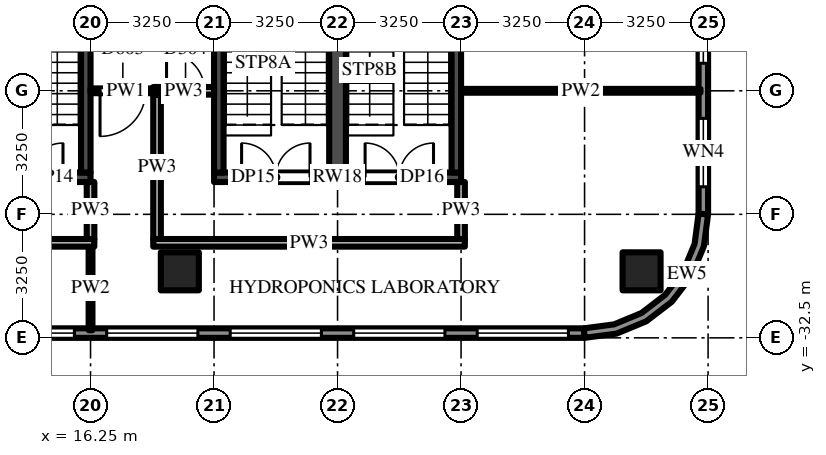
"""IFC4 building model, lengths in metres.
Left out: names, types, materials, properties, quantities, classifications, styles, units other than length and angle.
Written with IfcOpenShell. Run it as: python <this file> out.ifc"""

import sys

from ifc_helpers import new_model, si_unit, direction, frame, frame_2d, origin, origin_2d, place, context, subcontext, project, spatial, polyline, rectangle, outline, extrude, source, transform, mapped, element, fill, save


model = new_model("IFC4")
c1 = context("Model", 3, precision=1e-05, world=origin(), true_north=direction((0.0, 1.0)))
c2 = subcontext(c1, "Body", "Model", "MODEL_VIEW")
j1 = project(units=[si_unit("LENGTHUNIT", "METRE"), si_unit("PLANEANGLEUNIT", "RADIAN")], contexts=[c1])
p1 = place(None, origin())
s1 = spatial("IfcSite", under=j1, at=p1, CompositionType="ELEMENT")
p2 = place(p1, origin())
s2 = spatial("IfcBuilding", under=s1, at=p2, CompositionType="ELEMENT")
p3 = place(p2, frame((0.0, 0.0, 24.0)))
s3 = spatial("IfcBuildingStorey", under=s2, at=p3, CompositionType="ELEMENT", Elevation=24.0)
m1 = source(origin(), c2, "Body", "SweptSolid", [
    extrude(rectangle(XDim=1.0, YDim=1.0, at=origin_2d()), origin(), (0.0, 0.0, 1.0), 5.0),
])
for number, where, z_axis, x_axis in (
    (1, (18.6, -30.75, 0.0), (0.0, 0.0, 1.0), (1.0, 0.0, 0.0)),
    (2, (30.75, -30.75, 0.0), (0.0, 0.0, 1.0), (1.0, 0.0, 0.0)),
):
    element("IfcColumn", number, at=place(p3, frame(where, z_axis=z_axis, x_axis=x_axis)), inside=s3, PredefinedType="COLUMN", context=c2, shape_type="MappedRepresentation", body=[
        mapped(m1, transform((0.0, 0.0, 0.0))),
    ])
m2 = source(origin(), c2, "Body", "SweptSolid", [
    extrude(rectangle(XDim=6.5, YDim=0.25, at=frame_2d((3.25, 0.0))), origin(), (0.0, 0.0, 1.0), 4.7),
])
p4 = place(p3, frame((9.75, -28.275, 0.0), z_axis=(0.0, 0.0, 1.0), x_axis=(1.0, 0.0, 0.0)))
e3 = element("IfcWall", 3, at=p4, inside=s3, PredefinedType="SHEAR", context=c2, shape_type="MappedRepresentation", body=[
    mapped(m2, transform((0.0, 0.0, 0.0))),
])
m3 = source(origin(), c2, "Body", "SweptSolid", [
    extrude(rectangle(XDim=1.8, YDim=2.1, at=frame_2d((0.9, 1.05))), frame((0.0, 0.135, 0.0), z_axis=(0.0, -1.0, 0.0), x_axis=(1.0, 0.0, 0.0)), (0.0, 0.0, 1.0), 0.27),
])
p5 = place(p4, frame((0.725, 0.0, 0.0)))
e4 = element("IfcOpeningElement", 4, at=p5, cuts=e3, PredefinedType="OPENING", context=c2, shape_type="MappedRepresentation", body=[
    mapped(m3, transform((0.0, 0.0, 0.0))),
])
p6 = place(p4, frame((3.975, 0.0, 0.0)))
e5 = element("IfcOpeningElement", 5, at=p6, cuts=e3, PredefinedType="OPENING", context=c2, shape_type="MappedRepresentation", body=[
    mapped(m3, transform((0.0, 0.0, 0.0))),
])
m4 = source(origin(), c2, "Body", "SweptSolid", [
    extrude(rectangle(XDim=8.3, YDim=0.25, at=frame_2d((4.15, 0.0))), origin(), (0.0, 0.0, 1.0), 4.7),
])
p7 = place(p3, frame((16.125, -28.15, 0.0), z_axis=(0.0, 0.0, 1.0), x_axis=(0.0, 1.0, 0.0)))
e6 = element("IfcWall", 6, at=p7, inside=s3, PredefinedType="SHEAR", context=c2, shape_type="MappedRepresentation", body=[
    mapped(m4, transform((0.0, 0.0, 0.0))),
])
p8 = place(p3, frame((19.5, -28.275, 0.0), z_axis=(0.0, 0.0, 1.0), x_axis=(1.0, 0.0, 0.0)))
e7 = element("IfcWall", 7, at=p8, inside=s3, PredefinedType="SHEAR", context=c2, shape_type="MappedRepresentation", body=[
    mapped(m2, transform((0.0, 0.0, 0.0))),
])
p9 = place(p8, frame((0.725, 0.0, 0.0)))
e8 = element("IfcOpeningElement", 8, at=p9, cuts=e7, PredefinedType="OPENING", context=c2, shape_type="MappedRepresentation", body=[
    mapped(m3, transform((0.0, 0.0, 0.0))),
])
p10 = place(p8, frame((3.975, 0.0, 0.0)))
e9 = element("IfcOpeningElement", 9, at=p10, cuts=e7, PredefinedType="OPENING", context=c2, shape_type="MappedRepresentation", body=[
    mapped(m3, transform((0.0, 0.0, 0.0))),
])
for number, where, z_axis, x_axis in (
    (10, (19.625, -28.15, 0.0), (0.0, 0.0, 1.0), (0.0, 1.0, 0.0)),
    (11, (25.875, -28.15, 0.0), (0.0, 0.0, 1.0), (0.0, 1.0, 0.0)),
):
    element("IfcWall", number, at=place(p3, frame(where, z_axis=z_axis, x_axis=x_axis)), inside=s3, PredefinedType="SHEAR", context=c2, shape_type="MappedRepresentation", body=[
        mapped(m4, transform((0.0, 0.0, 0.0))),
    ])
m5 = source(origin(), c2, "Body", "SweptSolid", [
    extrude(rectangle(XDim=8.3, YDim=0.44, at=frame_2d((4.15, 0.0))), origin(), (0.0, 0.0, 1.0), 4.7),
])
p11 = place(p3, frame((22.75, -28.15, 0.0), z_axis=(0.0, 0.0, 1.0), x_axis=(0.0, 1.0, 0.0)))
e12 = element("IfcWall", 12, at=p11, inside=s3, PredefinedType="SHEAR", context=c2, shape_type="MappedRepresentation", body=[
    mapped(m5, transform((0.0, 0.0, 0.0))),
])
m6 = source(origin(), c2, "Body", "SweptSolid", [
    extrude(rectangle(XDim=58.5, YDim=0.25, at=frame_2d((29.25, 0.0))), origin(), (0.0, 0.0, 1.0), 4.7),
])
p12 = place(p3, frame((32.375, -29.25, 0.0), z_axis=(0.0, 0.0, 1.0), x_axis=(0.0, 1.0, 0.0)))
e13 = element("IfcWall", 13, at=p12, inside=s3, PredefinedType="SOLIDWALL", context=c2, shape_type="MappedRepresentation", body=[
    mapped(m6, transform((0.0, 0.0, 0.0))),
])
m7 = source(origin(), c2, "Body", "SweptSolid", [
    extrude(rectangle(XDim=1.8, YDim=3.3, at=frame_2d((0.9, 1.65))), frame((0.0, 0.135, 0.0), z_axis=(0.0, -1.0, 0.0), x_axis=(1.0, 0.0, 0.0)), (0.0, 0.0, 1.0), 0.27),
])
p13 = place(p12, frame((0.725, 0.0, 0.6)))
e14 = element("IfcOpeningElement", 14, at=p13, cuts=e13, PredefinedType="OPENING", context=c2, shape_type="MappedRepresentation", body=[
    mapped(m7, transform((0.0, 0.0, 0.0))),
])
p14 = place(p12, frame((3.975, 0.0, 0.6)))
e15 = element("IfcOpeningElement", 15, at=p14, cuts=e13, PredefinedType="OPENING", context=c2, shape_type="MappedRepresentation", body=[
    mapped(m7, transform((0.0, 0.0, 0.0))),
])
p15 = place(p12, frame((7.225, 0.0, 0.6)))
e16 = element("IfcOpeningElement", 16, at=p15, cuts=e13, PredefinedType="OPENING", context=c2, shape_type="MappedRepresentation", body=[
    mapped(m7, transform((0.0, 0.0, 0.0))),
])
p16 = place(p12, frame((10.475, 0.0, 0.6)))
e17 = element("IfcOpeningElement", 17, at=p16, cuts=e13, PredefinedType="OPENING", context=c2, shape_type="MappedRepresentation", body=[
    mapped(m7, transform((0.0, 0.0, 0.0))),
])
p17 = place(p12, frame((13.725, 0.0, 0.6)))
e18 = element("IfcOpeningElement", 18, at=p17, cuts=e13, PredefinedType="OPENING", context=c2, shape_type="MappedRepresentation", body=[
    mapped(m7, transform((0.0, 0.0, 0.0))),
])
p18 = place(p12, frame((16.975, 0.0, 0.6)))
e19 = element("IfcOpeningElement", 19, at=p18, cuts=e13, PredefinedType="OPENING", context=c2, shape_type="MappedRepresentation", body=[
    mapped(m7, transform((0.0, 0.0, 0.0))),
])
p19 = place(p12, frame((20.225, 0.0, 0.6)))
e20 = element("IfcOpeningElement", 20, at=p19, cuts=e13, PredefinedType="OPENING", context=c2, shape_type="MappedRepresentation", body=[
    mapped(m7, transform((0.0, 0.0, 0.0))),
])
p20 = place(p12, frame((23.475, 0.0, 0.6)))
e21 = element("IfcOpeningElement", 21, at=p20, cuts=e13, PredefinedType="OPENING", context=c2, shape_type="MappedRepresentation", body=[
    mapped(m7, transform((0.0, 0.0, 0.0))),
])
p21 = place(p12, frame((26.725, 0.0, 0.6)))
e22 = element("IfcOpeningElement", 22, at=p21, cuts=e13, PredefinedType="OPENING", context=c2, shape_type="MappedRepresentation", body=[
    mapped(m7, transform((0.0, 0.0, 0.0))),
])
p22 = place(p12, frame((29.975, 0.0, 0.6)))
e23 = element("IfcOpeningElement", 23, at=p22, cuts=e13, PredefinedType="OPENING", context=c2, shape_type="MappedRepresentation", body=[
    mapped(m7, transform((0.0, 0.0, 0.0))),
])
p23 = place(p12, frame((33.225, 0.0, 0.6)))
e24 = element("IfcOpeningElement", 24, at=p23, cuts=e13, PredefinedType="OPENING", context=c2, shape_type="MappedRepresentation", body=[
    mapped(m7, transform((0.0, 0.0, 0.0))),
])
p24 = place(p12, frame((36.475, 0.0, 0.6)))
e25 = element("IfcOpeningElement", 25, at=p24, cuts=e13, PredefinedType="OPENING", context=c2, shape_type="MappedRepresentation", body=[
    mapped(m7, transform((0.0, 0.0, 0.0))),
])
p25 = place(p12, frame((39.725, 0.0, 0.6)))
e26 = element("IfcOpeningElement", 26, at=p25, cuts=e13, PredefinedType="OPENING", context=c2, shape_type="MappedRepresentation", body=[
    mapped(m7, transform((0.0, 0.0, 0.0))),
])
p26 = place(p12, frame((42.975, 0.0, 0.6)))
e27 = element("IfcOpeningElement", 27, at=p26, cuts=e13, PredefinedType="OPENING", context=c2, shape_type="MappedRepresentation", body=[
    mapped(m7, transform((0.0, 0.0, 0.0))),
])
p27 = place(p12, frame((46.225, 0.0, 0.6)))
e28 = element("IfcOpeningElement", 28, at=p27, cuts=e13, PredefinedType="OPENING", context=c2, shape_type="MappedRepresentation", body=[
    mapped(m7, transform((0.0, 0.0, 0.0))),
])
p28 = place(p12, frame((49.475, 0.0, 0.6)))
e29 = element("IfcOpeningElement", 29, at=p28, cuts=e13, PredefinedType="OPENING", context=c2, shape_type="MappedRepresentation", body=[
    mapped(m7, transform((0.0, 0.0, 0.0))),
])
p29 = place(p12, frame((52.725, 0.0, 0.6)))
e30 = element("IfcOpeningElement", 30, at=p29, cuts=e13, PredefinedType="OPENING", context=c2, shape_type="MappedRepresentation", body=[
    mapped(m7, transform((0.0, 0.0, 0.0))),
])
p30 = place(p12, frame((55.975, 0.0, 0.6)))
e31 = element("IfcOpeningElement", 31, at=p30, cuts=e13, PredefinedType="OPENING", context=c2, shape_type="MappedRepresentation", body=[
    mapped(m7, transform((0.0, 0.0, 0.0))),
])
p31 = place(p3, frame((-29.25, -32.375, 0.0), z_axis=(0.0, 0.0, 1.0), x_axis=(1.0, 0.0, 0.0)))
e32 = element("IfcWall", 32, at=p31, inside=s3, PredefinedType="SOLIDWALL", context=c2, shape_type="MappedRepresentation", body=[
    mapped(m6, transform((0.0, 0.0, 0.0))),
])
m8 = source(origin(), c2, "Body", "SweptSolid", [
    extrude(rectangle(XDim=2.4, YDim=3.3, at=frame_2d((1.2, 1.65))), frame((0.0, 0.135, 0.0), z_axis=(0.0, -1.0, 0.0), x_axis=(1.0, 0.0, 0.0)), (0.0, 0.0, 1.0), 0.27),
])
p32 = place(p31, frame((0.425, 0.0, 0.6)))
e33 = element("IfcOpeningElement", 33, at=p32, cuts=e32, PredefinedType="OPENING", context=c2, shape_type="MappedRepresentation", body=[
    mapped(m8, transform((0.0, 0.0, 0.0))),
])
p33 = place(p31, frame((3.675, 0.0, 0.6)))
e34 = element("IfcOpeningElement", 34, at=p33, cuts=e32, PredefinedType="OPENING", context=c2, shape_type="MappedRepresentation", body=[
    mapped(m8, transform((0.0, 0.0, 0.0))),
])
p34 = place(p31, frame((6.925, 0.0, 0.6)))
e35 = element("IfcOpeningElement", 35, at=p34, cuts=e32, PredefinedType="OPENING", context=c2, shape_type="MappedRepresentation", body=[
    mapped(m8, transform((0.0, 0.0, 0.0))),
])
p35 = place(p31, frame((10.175, 0.0, 0.6)))
e36 = element("IfcOpeningElement", 36, at=p35, cuts=e32, PredefinedType="OPENING", context=c2, shape_type="MappedRepresentation", body=[
    mapped(m8, transform((0.0, 0.0, 0.0))),
])
p36 = place(p31, frame((13.425, 0.0, 0.6)))
e37 = element("IfcOpeningElement", 37, at=p36, cuts=e32, PredefinedType="OPENING", context=c2, shape_type="MappedRepresentation", body=[
    mapped(m8, transform((0.0, 0.0, 0.0))),
])
p37 = place(p31, frame((16.675, 0.0, 0.6)))
e38 = element("IfcOpeningElement", 38, at=p37, cuts=e32, PredefinedType="OPENING", context=c2, shape_type="MappedRepresentation", body=[
    mapped(m8, transform((0.0, 0.0, 0.0))),
])
p38 = place(p31, frame((19.925, 0.0, 0.6)))
e39 = element("IfcOpeningElement", 39, at=p38, cuts=e32, PredefinedType="OPENING", context=c2, shape_type="MappedRepresentation", body=[
    mapped(m8, transform((0.0, 0.0, 0.0))),
])
p39 = place(p31, frame((23.175, 0.0, 0.6)))
e40 = element("IfcOpeningElement", 40, at=p39, cuts=e32, PredefinedType="OPENING", context=c2, shape_type="MappedRepresentation", body=[
    mapped(m8, transform((0.0, 0.0, 0.0))),
])
p40 = place(p31, frame((26.425, 0.0, 0.6)))
e41 = element("IfcOpeningElement", 41, at=p40, cuts=e32, PredefinedType="OPENING", context=c2, shape_type="MappedRepresentation", body=[
    mapped(m8, transform((0.0, 0.0, 0.0))),
])
p41 = place(p31, frame((29.675, 0.0, 0.6)))
e42 = element("IfcOpeningElement", 42, at=p41, cuts=e32, PredefinedType="OPENING", context=c2, shape_type="MappedRepresentation", body=[
    mapped(m8, transform((0.0, 0.0, 0.0))),
])
p42 = place(p31, frame((32.925, 0.0, 0.6)))
e43 = element("IfcOpeningElement", 43, at=p42, cuts=e32, PredefinedType="OPENING", context=c2, shape_type="MappedRepresentation", body=[
    mapped(m8, transform((0.0, 0.0, 0.0))),
])
p43 = place(p31, frame((36.175, 0.0, 0.6)))
e44 = element("IfcOpeningElement", 44, at=p43, cuts=e32, PredefinedType="OPENING", context=c2, shape_type="MappedRepresentation", body=[
    mapped(m8, transform((0.0, 0.0, 0.0))),
])
p44 = place(p31, frame((39.425, 0.0, 0.6)))
e45 = element("IfcOpeningElement", 45, at=p44, cuts=e32, PredefinedType="OPENING", context=c2, shape_type="MappedRepresentation", body=[
    mapped(m8, transform((0.0, 0.0, 0.0))),
])
p45 = place(p31, frame((42.675, 0.0, 0.6)))
e46 = element("IfcOpeningElement", 46, at=p45, cuts=e32, PredefinedType="OPENING", context=c2, shape_type="MappedRepresentation", body=[
    mapped(m8, transform((0.0, 0.0, 0.0))),
])
p46 = place(p31, frame((45.925, 0.0, 0.6)))
e47 = element("IfcOpeningElement", 47, at=p46, cuts=e32, PredefinedType="OPENING", context=c2, shape_type="MappedRepresentation", body=[
    mapped(m8, transform((0.0, 0.0, 0.0))),
])
p47 = place(p31, frame((49.175, 0.0, 0.6)))
e48 = element("IfcOpeningElement", 48, at=p47, cuts=e32, PredefinedType="OPENING", context=c2, shape_type="MappedRepresentation", body=[
    mapped(m8, transform((0.0, 0.0, 0.0))),
])
p48 = place(p31, frame((52.425, 0.0, 0.6)))
e49 = element("IfcOpeningElement", 49, at=p48, cuts=e32, PredefinedType="OPENING", context=c2, shape_type="MappedRepresentation", body=[
    mapped(m8, transform((0.0, 0.0, 0.0))),
])
p49 = place(p31, frame((55.675, 0.0, 0.6)))
e50 = element("IfcOpeningElement", 50, at=p49, cuts=e32, PredefinedType="OPENING", context=c2, shape_type="MappedRepresentation", body=[
    mapped(m8, transform((0.0, 0.0, 0.0))),
])
p50 = place(p3, origin())
e51 = element("IfcWall", 51, at=p50, inside=s3, PredefinedType="SOLIDWALL", context=c2, shape_type="SweptSolid", body=[
    extrude(outline(polyline([(29.25, -32.5), (30.091, -32.389), (30.875, -32.065), (31.548, -31.548), (32.065, -30.875), (32.389, -30.091), (32.5, -29.25), (32.25, -29.234), (32.146, -30.026), (31.846, -30.749), (31.37, -31.37), (30.749, -31.846), (30.026, -32.146), (29.234, -32.25), (29.25, -32.5)])), origin(), (0.0, 0.0, 1.0), 4.7),
])
m9 = source(origin(), c2, "Body", "SweptSolid", [
    extrude(rectangle(XDim=1.5, YDim=0.2, at=frame_2d((0.75, 0.0))), origin(), (0.0, 0.0, 1.0), 4.7),
])
p51 = place(p3, frame((16.25, -28.4, 0.0), z_axis=(0.0, 0.0, 1.0), x_axis=(0.0, -1.0, 0.0)))
e52 = element("IfcWall", 52, at=p51, inside=s3, PredefinedType="PARTITIONING", context=c2, shape_type="MappedRepresentation", body=[
    mapped(m9, transform((0.0, 0.0, 0.0))),
])
m10 = source(origin(), c2, "Body", "SweptSolid", [
    extrude(rectangle(XDim=2.2, YDim=0.1, at=frame_2d((1.1, 0.0))), origin(), (0.0, 0.0, 1.0), 3.762),
])
p52 = place(p3, frame((16.25, -32.3, 0.0), z_axis=(0.0, 0.0, 1.0), x_axis=(0.0, 1.0, 0.0)))
e53 = element("IfcWall", 53, at=p52, inside=s3, PredefinedType="PARTITIONING", context=c2, shape_type="MappedRepresentation", body=[
    mapped(m10, transform((0.0, 0.0, 0.0))),
])
m11 = source(origin(), c2, "Body", "SweptSolid", [
    extrude(rectangle(XDim=3.8, YDim=0.2, at=frame_2d((1.9, 0.0))), origin(), (0.0, 0.0, 1.0), 4.274),
])
p53 = place(p3, frame((18.0, -26.1, 0.0), z_axis=(0.0, 0.0, 1.0), x_axis=(0.0, -1.0, 0.0)))
e54 = element("IfcWall", 54, at=p53, inside=s3, PredefinedType="PARTITIONING", context=c2, shape_type="MappedRepresentation", body=[
    mapped(m11, transform((0.0, 0.0, 0.0))),
])
p54 = place(p3, frame((26.0, -28.4, 0.0), z_axis=(0.0, 0.0, 1.0), x_axis=(0.0, -1.0, 0.0)))
e55 = element("IfcWall", 55, at=p54, inside=s3, PredefinedType="PARTITIONING", context=c2, shape_type="MappedRepresentation", body=[
    mapped(m9, transform((0.0, 0.0, 0.0))),
])
m12 = source(origin(), c2, "Body", "SweptSolid", [
    extrude(rectangle(XDim=8.2, YDim=0.2, at=frame_2d((4.1, 0.0))), origin(), (0.0, 0.0, 1.0), 4.7),
])
p55 = place(p3, frame((8.15, -30.0, 0.0), z_axis=(0.0, 0.0, 1.0), x_axis=(1.0, 0.0, 0.0)))
e56 = element("IfcWall", 56, at=p55, inside=s3, PredefinedType="PARTITIONING", context=c2, shape_type="MappedRepresentation", body=[
    mapped(m12, transform((0.0, 0.0, 0.0))),
])
m13 = source(origin(), c2, "Body", "SweptSolid", [
    extrude(rectangle(XDim=8.2, YDim=0.2, at=frame_2d((4.1, 0.0))), origin(), (0.0, 0.0, 1.0), 3.762),
])
p56 = place(p3, frame((17.9, -30.0, 0.0), z_axis=(0.0, 0.0, 1.0), x_axis=(1.0, 0.0, 0.0)))
e57 = element("IfcWall", 57, at=p56, inside=s3, PredefinedType="PARTITIONING", context=c2, shape_type="MappedRepresentation", body=[
    mapped(m13, transform((0.0, 0.0, 0.0))),
])
m14 = source(origin(), c2, "Body", "SweptSolid", [
    extrude(rectangle(XDim=1.6, YDim=0.2, at=frame_2d((0.8, 0.0))), origin(), (0.0, 0.0, 1.0), 3.762),
])
p57 = place(p3, frame((17.9, -26.0, 0.0), z_axis=(0.0, 0.0, 1.0), x_axis=(1.0, 0.0, 0.0)))
e58 = element("IfcWall", 58, at=p57, inside=s3, PredefinedType="PARTITIONING", context=c2, shape_type="MappedRepresentation", body=[
    mapped(m14, transform((0.0, 0.0, 0.0))),
])
m15 = source(origin(), c2, "Body", "SweptSolid", [
    extrude(rectangle(XDim=1.0, YDim=2.1, at=frame_2d((0.5, 1.05))), frame((0.0, 0.11, 0.0), z_axis=(0.0, -1.0, 0.0), x_axis=(1.0, 0.0, 0.0)), (0.0, 0.0, 1.0), 0.22),
])
p58 = place(p57, frame((0.35, 0.0, 0.0)))
e59 = element("IfcOpeningElement", 59, at=p58, cuts=e58, PredefinedType="OPENING", context=c2, shape_type="MappedRepresentation", body=[
    mapped(m15, transform((0.0, 0.0, 0.0))),
])
m16 = source(origin(), c2, "Body", "SweptSolid", [
    extrude(rectangle(XDim=6.3, YDim=0.1, at=frame_2d((3.15, 0.0))), origin(), (0.0, 0.0, 1.0), 3.762),
])
p59 = place(p3, frame((26.0, -26.0, 0.0), z_axis=(0.0, 0.0, 1.0), x_axis=(1.0, 0.0, 0.0)))
e60 = element("IfcWall", 60, at=p59, inside=s3, PredefinedType="PARTITIONING", context=c2, shape_type="MappedRepresentation", body=[
    mapped(m16, transform((0.0, 0.0, 0.0))),
])
m17 = source(origin(), c2, "Body", "SweptSolid", [
    extrude(rectangle(XDim=1.85, YDim=0.125, at=frame_2d((0.925, 0.0))), origin(), (0.0, 0.0, 1.0), 4.7),
])
p60 = place(p3, frame((18.1, -26.0, 0.0), z_axis=(0.0, 0.0, 1.0), x_axis=(-1.0, 0.0, 0.0)))
e61 = element("IfcWall", 61, at=p60, inside=s3, PredefinedType="PARTITIONING", context=c2, shape_type="MappedRepresentation", body=[
    mapped(m17, transform((0.0, 0.0, 0.0))),
])
m18 = source(origin(), c2, "Body", "SweptSolid", [
    extrude(rectangle(XDim=1.2, YDim=2.1, at=frame_2d((0.6, 1.05))), frame((0.0, 0.073, 0.0), z_axis=(0.0, -1.0, 0.0), x_axis=(1.0, 0.0, 0.0)), (0.0, 0.0, 1.0), 0.145),
])
p61 = place(p60, frame((0.4, 0.0, 0.0)))
e62 = element("IfcOpeningElement", 62, at=p61, cuts=e61, PredefinedType="OPENING", context=c2, shape_type="MappedRepresentation", body=[
    mapped(m18, transform((0.0, 0.0, 0.0))),
])
m19 = source(origin(), c2, "Body", "SweptSolid", [
    extrude(rectangle(XDim=1.8, YDim=2.1, at=frame_2d((0.9, 1.05))), frame((0.0, 0.025, 0.0), z_axis=(0.0, -1.0, 0.0), x_axis=(1.0, 0.0, 0.0)), (0.0, 0.0, 1.0), 0.05),
])
p62 = place(p6, origin())
e63 = element("IfcDoor", 63, at=p62, inside=s3, OperationType="DOUBLE_DOOR_SINGLE_SWING", PredefinedType="DOOR", context=c2, shape_type="MappedRepresentation", body=[
    mapped(m19, transform((0.0, 0.0, 0.0))),
])
fill(e5, e63)
p63 = place(p9, origin())
e64 = element("IfcDoor", 64, at=p63, inside=s3, OperationType="DOUBLE_DOOR_SINGLE_SWING", PredefinedType="DOOR", context=c2, shape_type="MappedRepresentation", body=[
    mapped(m19, transform((0.0, 0.0, 0.0))),
])
fill(e8, e64)
p64 = place(p10, origin())
e65 = element("IfcDoor", 65, at=p64, inside=s3, OperationType="DOUBLE_DOOR_SINGLE_SWING", PredefinedType="DOOR", context=c2, shape_type="MappedRepresentation", body=[
    mapped(m19, transform((0.0, 0.0, 0.0))),
])
fill(e9, e65)
m20 = source(origin(), c2, "Body", "SweptSolid", [
    extrude(rectangle(XDim=1.8, YDim=3.3, at=frame_2d((0.9, 1.65))), frame((0.0, 0.03, 0.0), z_axis=(0.0, -1.0, 0.0), x_axis=(1.0, 0.0, 0.0)), (0.0, 0.0, 1.0), 0.06),
])
p65 = place(p13, origin())
e66 = element("IfcWindow", 66, at=p65, inside=s3, PartitioningType="SINGLE_PANEL", PredefinedType="WINDOW", context=c2, shape_type="MappedRepresentation", body=[
    mapped(m20, transform((0.0, 0.0, 0.0))),
])
fill(e14, e66)
p66 = place(p14, origin())
e67 = element("IfcWindow", 67, at=p66, inside=s3, PartitioningType="SINGLE_PANEL", PredefinedType="WINDOW", context=c2, shape_type="MappedRepresentation", body=[
    mapped(m20, transform((0.0, 0.0, 0.0))),
])
fill(e15, e67)
m21 = source(origin(), c2, "Body", "SweptSolid", [
    extrude(rectangle(XDim=2.4, YDim=3.3, at=frame_2d((1.2, 1.65))), frame((0.0, 0.03, 0.0), z_axis=(0.0, -1.0, 0.0), x_axis=(1.0, 0.0, 0.0)), (0.0, 0.0, 1.0), 0.06),
])
p67 = place(p45, origin())
e68 = element("IfcWindow", 68, at=p67, inside=s3, PartitioningType="SINGLE_PANEL", PredefinedType="WINDOW", context=c2, shape_type="MappedRepresentation", body=[
    mapped(m21, transform((0.0, 0.0, 0.0))),
])
fill(e46, e68)
p68 = place(p46, origin())
e69 = element("IfcWindow", 69, at=p68, inside=s3, PartitioningType="SINGLE_PANEL", PredefinedType="WINDOW", context=c2, shape_type="MappedRepresentation", body=[
    mapped(m21, transform((0.0, 0.0, 0.0))),
])
fill(e47, e69)
p69 = place(p47, origin())
e70 = element("IfcWindow", 70, at=p69, inside=s3, PartitioningType="SINGLE_PANEL", PredefinedType="WINDOW", context=c2, shape_type="MappedRepresentation", body=[
    mapped(m21, transform((0.0, 0.0, 0.0))),
])
fill(e48, e70)
p70 = place(p48, origin())
e71 = element("IfcWindow", 71, at=p70, inside=s3, PartitioningType="SINGLE_PANEL", PredefinedType="WINDOW", context=c2, shape_type="MappedRepresentation", body=[
    mapped(m21, transform((0.0, 0.0, 0.0))),
])
fill(e49, e71)
p71 = place(p49, origin())
e72 = element("IfcWindow", 72, at=p71, inside=s3, PartitioningType="SINGLE_PANEL", PredefinedType="WINDOW", context=c2, shape_type="MappedRepresentation", body=[
    mapped(m21, transform((0.0, 0.0, 0.0))),
])
fill(e50, e72)
m22 = source(origin(), c2, "Body", "SweptSolid", [
    extrude(rectangle(XDim=1.2, YDim=2.1, at=frame_2d((0.6, 1.05))), frame((0.0, 0.025, 0.0), z_axis=(0.0, -1.0, 0.0), x_axis=(1.0, 0.0, 0.0)), (0.0, 0.0, 1.0), 0.05),
])
p72 = place(p61, origin())
e73 = element("IfcDoor", 73, at=p72, inside=s3, OperationType="SINGLE_SWING_RIGHT", PredefinedType="DOOR", context=c2, shape_type="MappedRepresentation", body=[
    mapped(m22, transform((0.0, 0.0, 0.0))),
])
fill(e62, e73)
m23 = source(origin(), c2, "Body", "SweptSolid", [
    extrude(rectangle(XDim=1.0, YDim=2.1, at=frame_2d((0.5, 1.05))), frame((0.0, 0.025, 0.0), z_axis=(0.0, -1.0, 0.0), x_axis=(1.0, 0.0, 0.0)), (0.0, 0.0, 1.0), 0.05),
])
p73 = place(p58, origin())
e74 = element("IfcDoor", 74, at=p73, inside=s3, OperationType="SINGLE_SWING_LEFT", PredefinedType="DOOR", context=c2, shape_type="MappedRepresentation", body=[
    mapped(m23, transform((0.0, 0.0, 0.0))),
])
fill(e59, e74)
save(model, sys.argv[1])
